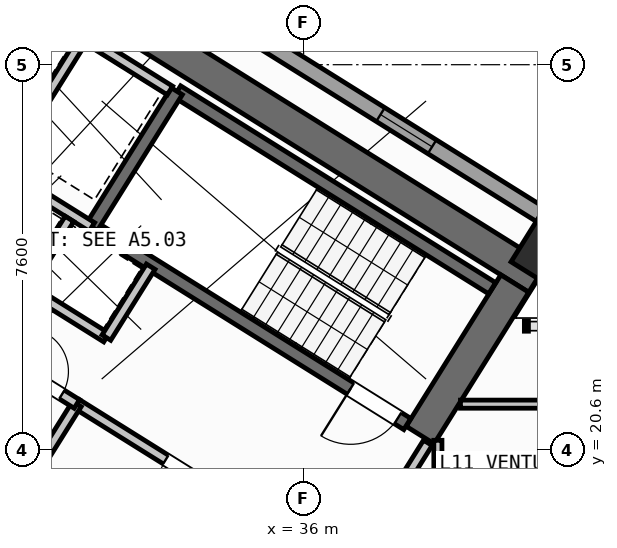
"""IFC4 building model, lengths in metres.
Left out: names, types, materials, properties, quantities, classifications, styles, units other than length and angle.
Written with IfcOpenShell. Run it as: python <this file> out.ifc"""

import sys

from ifc_helpers import new_model, si_unit, direction, frame, frame_2d, origin, origin_2d, place, context, subcontext, project, spatial, rectangle, hollow_rectangle, extrude, source, transform, mapped, element, fill, save


model = new_model("IFC4")
c1 = context("Model", 3, precision=1e-05, world=origin(), true_north=direction((0.0, 1.0)))
c2 = subcontext(c1, "Body", "Model", "MODEL_VIEW")
j1 = project(units=[si_unit("LENGTHUNIT", "METRE"), si_unit("PLANEANGLEUNIT", "RADIAN")], contexts=[c1])
p1 = place(None, origin())
s1 = spatial("IfcSite", under=j1, at=p1, CompositionType="ELEMENT")
p2 = place(p1, origin())
s2 = spatial("IfcBuilding", under=s1, at=p2, CompositionType="ELEMENT")
p3 = place(p2, frame((0.0, 0.0, 45.6)))
s3 = spatial("IfcBuildingStorey", under=s2, at=p3, CompositionType="ELEMENT", Elevation=45.6)
p4 = place(p3, frame((40.615, 23.983, 0.0), z_axis=(0.0, 0.0, 1.0), x_axis=(-0.848045953968, 0.529922692436, 0.0)))
e1 = element("IfcWall", 1, at=p4, inside=s3, PredefinedType="SHEAR", context=c2, shape_type="SweptSolid", body=[
    extrude(rectangle(XDim=13.24, YDim=0.65, at=frame_2d((6.62, 0.0))), origin(), (0.0, 0.0, 1.0), 3.35),
])
p5 = place(p3, frame((40.168, 23.88, 0.0), z_axis=(0.0, 0.0, 1.0), x_axis=(-0.529893103397, -0.8480644427, 0.0)))
e2 = element("IfcWall", 2, at=p5, inside=s3, PredefinedType="SHEAR", context=c2, shape_type="SweptSolid", body=[
    extrude(rectangle(XDim=3.525, YDim=0.65, at=frame_2d((1.763, 0.0))), origin(), (0.0, 0.0, 1.0), 3.35),
])
m1 = source(origin(), c2, "Body", "SweptSolid", [
    extrude(hollow_rectangle(XDim=1.0, YDim=1.0, WallThickness=0.04, at=origin_2d()), origin(), (0.0, 0.0, 1.0), 3.6),
])
p6 = place(p3, frame((40.783, 24.469, 0.0), z_axis=(0.0, 0.0, 1.0), x_axis=(-0.848048096156, 0.529919264233, 0.0)))
e3 = element("IfcColumn", 3, at=p6, inside=s3, PredefinedType="COLUMN", context=c2, shape_type="MappedRepresentation", body=[
    mapped(m1, transform((0.0, 0.0, 0.0), scale=1.0)),
])
p7 = place(p3, frame((14.138, 41.825, 0.0), z_axis=(0.0, 0.0, 1.0), x_axis=(0.848046498049, -0.529921821731, 0.0)))
e4 = element("IfcWall", 4, at=p7, inside=s3, PredefinedType="STANDARD", context=c2, shape_type="SweptSolid", body=[
    extrude(rectangle(XDim=31.588, YDim=0.32, at=frame_2d((15.794, 0.0))), origin(), (0.0, 0.0, 1.0), 3.35),
])
p8 = place(p7, frame((3.159, 0.0, 0.0)))
e5 = element("IfcOpeningElement", 5, at=p8, cuts=e4, PredefinedType="OPENING", context=c2, shape_type="SweptSolid", body=[
    extrude(rectangle(XDim=1.05, YDim=2.15, at=frame_2d((0.525, 1.075))), frame((0.0, 0.17, 0.0), z_axis=(0.0, -1.0, 0.0), x_axis=(1.0, 0.0, 0.0)), (0.0, 0.0, 1.0), 0.34),
])
p9 = place(p7, frame((0.906, 0.0, 1.0)))
e6 = element("IfcOpeningElement", 6, at=p9, cuts=e4, PredefinedType="OPENING", context=c2, shape_type="SweptSolid", body=[
    extrude(rectangle(XDim=0.9, YDim=1.25, at=frame_2d((0.45, 0.625))), frame((0.0, 0.17, 0.0), z_axis=(0.0, -1.0, 0.0), x_axis=(1.0, 0.0, 0.0)), (0.0, 0.0, 1.0), 0.34),
])
p10 = place(p7, frame((9.537, 0.0, 0.85)))
e7 = element("IfcOpeningElement", 7, at=p10, cuts=e4, PredefinedType="OPENING", context=c2, shape_type="SweptSolid", body=[
    extrude(rectangle(XDim=1.8, YDim=1.5, at=frame_2d((0.9, 0.75))), frame((0.0, 0.17, 0.0), z_axis=(0.0, -1.0, 0.0), x_axis=(1.0, 0.0, 0.0)), (0.0, 0.0, 1.0), 0.34),
])
p11 = place(p7, frame((13.899, 0.0, 0.85)))
e8 = element("IfcOpeningElement", 8, at=p11, cuts=e4, PredefinedType="OPENING", context=c2, shape_type="SweptSolid", body=[
    extrude(rectangle(XDim=1.5, YDim=1.5, at=frame_2d((0.75, 0.75))), frame((0.0, 0.17, 0.0), z_axis=(0.0, -1.0, 0.0), x_axis=(1.0, 0.0, 0.0)), (0.0, 0.0, 1.0), 0.34),
])
p12 = place(p7, frame((22.019, 0.0, 0.95)))
e9 = element("IfcOpeningElement", 9, at=p12, cuts=e4, PredefinedType="OPENING", context=c2, shape_type="SweptSolid", body=[
    extrude(rectangle(XDim=1.2, YDim=1.4, at=frame_2d((0.6, 0.7))), frame((0.0, 0.17, 0.0), z_axis=(0.0, -1.0, 0.0), x_axis=(1.0, 0.0, 0.0)), (0.0, 0.0, 1.0), 0.34),
])
p13 = place(p7, frame((27.569, 0.0, 0.95)))
e10 = element("IfcOpeningElement", 10, at=p13, cuts=e4, PredefinedType="OPENING", context=c2, shape_type="SweptSolid", body=[
    extrude(rectangle(XDim=1.2, YDim=1.4, at=frame_2d((0.6, 0.7))), frame((0.0, 0.17, 0.0), z_axis=(0.0, -1.0, 0.0), x_axis=(1.0, 0.0, 0.0)), (0.0, 0.0, 1.0), 0.34),
])
p14 = place(p3, frame((31.28, 18.261, 0.0), z_axis=(0.0, 0.0, 1.0), x_axis=(-0.848051618787, 0.529913626805, 0.0)))
e11 = element("IfcWall", 11, at=p14, inside=s3, PredefinedType="SHEAR", context=c2, shape_type="SweptSolid", body=[
    extrude(rectangle(XDim=7.46, YDim=0.26, at=frame_2d((3.73, 0.0))), origin(), (0.0, 0.0, 1.0), 3.35),
])
p15 = place(p14, frame((0.36, 0.0, 0.0)))
e12 = element("IfcOpeningElement", 12, at=p15, cuts=e11, PredefinedType="OPENING", context=c2, shape_type="SweptSolid", body=[
    extrude(rectangle(XDim=0.86, YDim=2.05, at=frame_2d((0.43, 1.025))), frame((0.0, 0.14, 0.0), z_axis=(0.0, -1.0, 0.0), x_axis=(1.0, 0.0, 0.0)), (0.0, 0.0, 1.0), 0.28),
])
p16 = place(p3, frame((39.721, 23.788, 0.0), z_axis=(0.0, 0.0, 1.0), x_axis=(-0.848054434086, 0.529909121291, 0.0)))
e13 = element("IfcWall", 13, at=p16, inside=s3, PredefinedType="SHEAR", context=c2, shape_type="SweptSolid", body=[
    extrude(rectangle(XDim=7.33, YDim=0.26, at=frame_2d((3.665, 0.0))), origin(), (0.0, 0.0, 1.0), 3.35),
])
p17 = place(p3, frame((38.046, 21.108, 0.0), z_axis=(0.0, 0.0, 1.0), x_axis=(-0.848054434086, 0.529909121291, 0.0)))
e14 = element("IfcWall", 14, at=p17, inside=s3, PredefinedType="SHEAR", context=c2, shape_type="SweptSolid", body=[
    extrude(rectangle(XDim=7.33, YDim=0.26, at=frame_2d((3.665, 0.0))), origin(), (0.0, 0.0, 1.0), 3.35),
])
p18 = place(p17, frame((0.22, 0.0, 0.0)))
e15 = element("IfcOpeningElement", 15, at=p18, cuts=e14, PredefinedType="OPENING", context=c2, shape_type="SweptSolid", body=[
    extrude(rectangle(XDim=1.1, YDim=2.1, at=frame_2d((0.55, 1.05))), frame((0.0, 0.14, 0.0), z_axis=(0.0, -1.0, 0.0), x_axis=(1.0, 0.0, 0.0)), (0.0, 0.0, 1.0), 0.28),
])
p19 = place(p3, frame((33.496, 27.677, 0.0), z_axis=(0.0, 0.0, 1.0), x_axis=(-0.529908658664, -0.84805472316, 0.0)))
e16 = element("IfcWall", 16, at=p19, inside=s3, PredefinedType="SHEAR", context=c2, shape_type="SweptSolid", body=[
    extrude(rectangle(XDim=3.16, YDim=0.26, at=frame_2d((1.58, 0.0))), origin(), (0.0, 0.0, 1.0), 3.35),
])
p20 = place(p3, frame((36.374, 18.474, 0.0), z_axis=(0.0, 0.0, 1.0), x_axis=(-0.848051071577, 0.529914502535, 0.0)))
e17 = element("IfcWall", 17, at=p20, inside=s3, PredefinedType="STANDARD", context=c2, shape_type="SweptSolid", body=[
    extrude(rectangle(XDim=5.718, YDim=0.2, at=frame_2d((2.859, 0.0))), origin(), (0.0, 0.0, 1.0), 3.34),
])
p21 = place(p20, frame((2.498, 0.0, 0.0)))
e18 = element("IfcOpeningElement", 18, at=p21, cuts=e17, PredefinedType="OPENING", context=c2, shape_type="SweptSolid", body=[
    extrude(rectangle(XDim=1.15, YDim=2.1, at=frame_2d((0.575, 1.05))), frame((0.0, 0.11, 0.0), z_axis=(0.0, -1.0, 0.0), x_axis=(1.0, 0.0, 0.0)), (0.0, 0.0, 1.0), 0.22),
])
p22 = place(p3, frame((31.822, 24.998, 0.0), z_axis=(0.0, 0.0, 1.0), x_axis=(-0.848058348634, 0.529902856485, 0.0)))
e19 = element("IfcWall", 19, at=p22, inside=s3, PredefinedType="STANDARD", context=c2, shape_type="SweptSolid", body=[
    extrude(rectangle(XDim=4.568, YDim=0.2, at=frame_2d((2.284, 0.0))), origin(), (0.0, 0.0, 1.0), 3.34),
])
p23 = place(p3, frame((32.108, 22.814, 0.0), z_axis=(0.0, 0.0, 1.0), x_axis=(-0.848042229521, 0.529928652696, 0.0)))
e20 = element("IfcWall", 20, at=p23, inside=s3, PredefinedType="STANDARD", context=c2, shape_type="SweptSolid", body=[
    extrude(rectangle(XDim=5.62, YDim=0.2, at=frame_2d((2.81, 0.0))), origin(), (0.0, 0.0, 1.0), 3.34),
])
p24 = place(p3, frame((32.982, 24.213, 0.0), z_axis=(0.0, 0.0, 1.0), x_axis=(-0.529839334948, -0.84809803628, 0.0)))
e21 = element("IfcWall", 21, at=p24, inside=s3, PredefinedType="STANDARD", context=c2, shape_type="SweptSolid", body=[
    extrude(rectangle(XDim=1.65, YDim=0.2, at=frame_2d((0.825, 0.0))), origin(), (0.0, 0.0, 1.0), 3.34),
])
p25 = place(p3, frame((31.645, 28.716, 0.0), z_axis=(0.0, 0.0, 1.0), x_axis=(-0.52986693015, -0.848080795876, 0.0)))
e22 = element("IfcWall", 22, at=p25, inside=s3, PredefinedType="STANDARD", context=c2, shape_type="SweptSolid", body=[
    extrude(rectangle(XDim=2.66, YDim=0.2, at=frame_2d((1.33, 0.0))), origin(), (0.0, 0.0, 1.0), 3.34),
])
p26 = place(p3, frame((33.363, 27.69, 0.0), z_axis=(0.0, 0.0, 1.0), x_axis=(-0.848053806312, 0.529910125964, 0.0)))
e23 = element("IfcWall", 23, at=p26, inside=s3, PredefinedType="STANDARD", context=c2, shape_type="SweptSolid", body=[
    extrude(rectangle(XDim=4.448, YDim=0.2, at=frame_2d((2.224, 0.0))), origin(), (0.0, 0.0, 1.0), 3.34),
])
p27 = place(p3, frame((31.379, 25.156, 0.0), z_axis=(0.0, 0.0, 1.0), x_axis=(-0.529998940003, -0.847998304005, 0.0)))
e24 = element("IfcWall", 24, at=p27, inside=s3, PredefinedType="STANDARD", context=c2, shape_type="SweptSolid", body=[
    extrude(rectangle(XDim=1.58, YDim=0.2, at=frame_2d((0.79, 0.0))), origin(), (0.0, 0.0, 1.0), 3.34),
])
p28 = place(p3, frame((31.525, 21.504, 0.0), z_axis=(0.0, 0.0, 1.0), x_axis=(-0.529907497854, -0.848055448493, 0.0)))
e25 = element("IfcWall", 25, at=p28, inside=s3, PredefinedType="STANDARD", context=c2, shape_type="SweptSolid", body=[
    extrude(rectangle(XDim=2.88, YDim=0.2, at=frame_2d((1.44, 0.0))), origin(), (0.0, 0.0, 1.0), 3.34),
])
p29 = place(p3, frame((31.525, 21.504, 0.0), z_axis=(0.0, 0.0, 1.0), x_axis=(-0.848044998614, 0.529924221305, 0.0)))
e26 = element("IfcWall", 26, at=p29, inside=s3, PredefinedType="STANDARD", context=c2, shape_type="SweptSolid", body=[
    extrude(rectangle(XDim=6.168, YDim=0.2, at=frame_2d((3.084, 0.0))), origin(), (0.0, 0.0, 1.0), 3.34),
])
p30 = place(p29, frame((4.4, 0.0, 0.0)))
e27 = element("IfcOpeningElement", 27, at=p30, cuts=e26, PredefinedType="OPENING", context=c2, shape_type="SweptSolid", body=[
    extrude(rectangle(XDim=0.86, YDim=2.05, at=frame_2d((0.43, 1.025))), frame((0.0, 0.11, 0.0), z_axis=(0.0, -1.0, 0.0), x_axis=(1.0, 0.0, 0.0)), (0.0, 0.0, 1.0), 0.22),
])
p31 = place(p29, frame((0.35, 0.0, 0.0)))
e28 = element("IfcOpeningElement", 28, at=p31, cuts=e26, PredefinedType="OPENING", context=c2, shape_type="SweptSolid", body=[
    extrude(rectangle(XDim=0.86, YDim=2.05, at=frame_2d((0.43, 1.025))), frame((0.0, 0.11, 0.0), z_axis=(0.0, -1.0, 0.0), x_axis=(1.0, 0.0, 0.0)), (0.0, 0.0, 1.0), 0.22),
])
p32 = place(p3, frame((38.451, 20.737, 0.0), z_axis=(0.0, 0.0, 1.0), x_axis=(-0.529924799939, -0.848044637038, 0.0)))
e29 = element("IfcWall", 29, at=p32, inside=s3, PredefinedType="STANDARD", context=c2, shape_type="SweptSolid", body=[
    extrude(rectangle(XDim=2.96, YDim=0.2, at=frame_2d((1.48, 0.0))), origin(), (0.0, 0.0, 1.0), 3.34),
])
p33 = place(p32, frame((1.46, 0.0, 0.0)))
e30 = element("IfcOpeningElement", 30, at=p33, cuts=e29, PredefinedType="OPENING", context=c2, shape_type="SweptSolid", body=[
    extrude(rectangle(XDim=0.86, YDim=2.05, at=frame_2d((0.43, 1.025))), frame((0.0, 0.11, 0.0), z_axis=(0.0, -1.0, 0.0), x_axis=(1.0, 0.0, 0.0)), (0.0, 0.0, 1.0), 0.22),
])
p34 = place(p3, frame((38.65, 17.93, 0.0), z_axis=(0.0, 0.0, 1.0), x_axis=(0.0, 1.0, 0.0)))
e31 = element("IfcWall", 31, at=p34, inside=s3, PredefinedType="PARTITIONING", context=c2, shape_type="SweptSolid", body=[
    extrude(rectangle(XDim=2.857, YDim=0.16, at=frame_2d((1.428, 0.0))), origin(), (0.0, 0.0, 1.0), 3.34),
])
p35 = place(p3, frame((39.095, 21.5, 0.0), z_axis=(0.0, 0.0, 1.0), x_axis=(1.0, 0.0, 0.0)))
e32 = element("IfcWall", 32, at=p35, inside=s3, PredefinedType="PARTITIONING", context=c2, shape_type="SweptSolid", body=[
    extrude(rectangle(XDim=7.094, YDim=0.16, at=frame_2d((3.547, 0.0))), origin(), (0.0, 0.0, 1.0), 3.34),
])
m2 = source(origin(), c2, "Body", "SweptSolid", [
    extrude(rectangle(XDim=1.2, YDim=1.4, at=frame_2d((0.6, 0.7))), frame((0.0, 0.03, 0.0), z_axis=(0.0, -1.0, 0.0), x_axis=(1.0, 0.0, 0.0)), (0.0, 0.0, 1.0), 0.06),
])
p36 = place(p13, origin())
e33 = element("IfcWindow", 33, at=p36, inside=s3, PartitioningType="SINGLE_PANEL", PredefinedType="WINDOW", context=c2, shape_type="MappedRepresentation", body=[
    mapped(m2, transform((0.0, 0.0, 0.0), scale=1.0)),
])
fill(e10, e33)
m3 = source(origin(), c2, "Body", "SweptSolid", [
    extrude(rectangle(XDim=1.1, YDim=2.1, at=frame_2d((0.55, 1.05))), frame((0.0, 0.025, 0.0), z_axis=(0.0, -1.0, 0.0), x_axis=(1.0, 0.0, 0.0)), (0.0, 0.0, 1.0), 0.05),
])
p37 = place(p18, origin())
e34 = element("IfcDoor", 34, at=p37, inside=s3, OperationType="SINGLE_SWING_RIGHT", PredefinedType="DOOR", context=c2, shape_type="MappedRepresentation", body=[
    mapped(m3, transform((0.0, 0.0, 0.0), scale=1.0)),
])
fill(e15, e34)
m4 = source(origin(), c2, "Body", "SweptSolid", [
    extrude(rectangle(XDim=1.15, YDim=2.1, at=frame_2d((0.575, 1.05))), frame((0.0, 0.025, 0.0), z_axis=(0.0, -1.0, 0.0), x_axis=(1.0, 0.0, 0.0)), (0.0, 0.0, 1.0), 0.05),
])
p38 = place(p21, origin())
e35 = element("IfcDoor", 35, at=p38, inside=s3, OperationType="SINGLE_SWING_LEFT", PredefinedType="DOOR", context=c2, shape_type="MappedRepresentation", body=[
    mapped(m4, transform((0.0, 0.0, 0.0), scale=1.0)),
])
fill(e18, e35)
m5 = source(origin(), c2, "Body", "SweptSolid", [
    extrude(rectangle(XDim=0.86, YDim=2.05, at=frame_2d((0.43, 1.025))), frame((0.0, 0.025, 0.0), z_axis=(0.0, -1.0, 0.0), x_axis=(1.0, 0.0, 0.0)), (0.0, 0.0, 1.0), 0.05),
])
p39 = place(p31, frame((0.86, 0.0, 0.0), z_axis=(0.0, 0.0, 1.0), x_axis=(-1.0, 0.0, 0.0)))
e36 = element("IfcDoor", 36, at=p39, inside=s3, OperationType="SINGLE_SWING_LEFT", PredefinedType="DOOR", context=c2, shape_type="MappedRepresentation", body=[
    mapped(m5, transform((0.0, 0.0, 0.0), scale=1.0)),
])
fill(e28, e36)
save(model, sys.argv[1])
